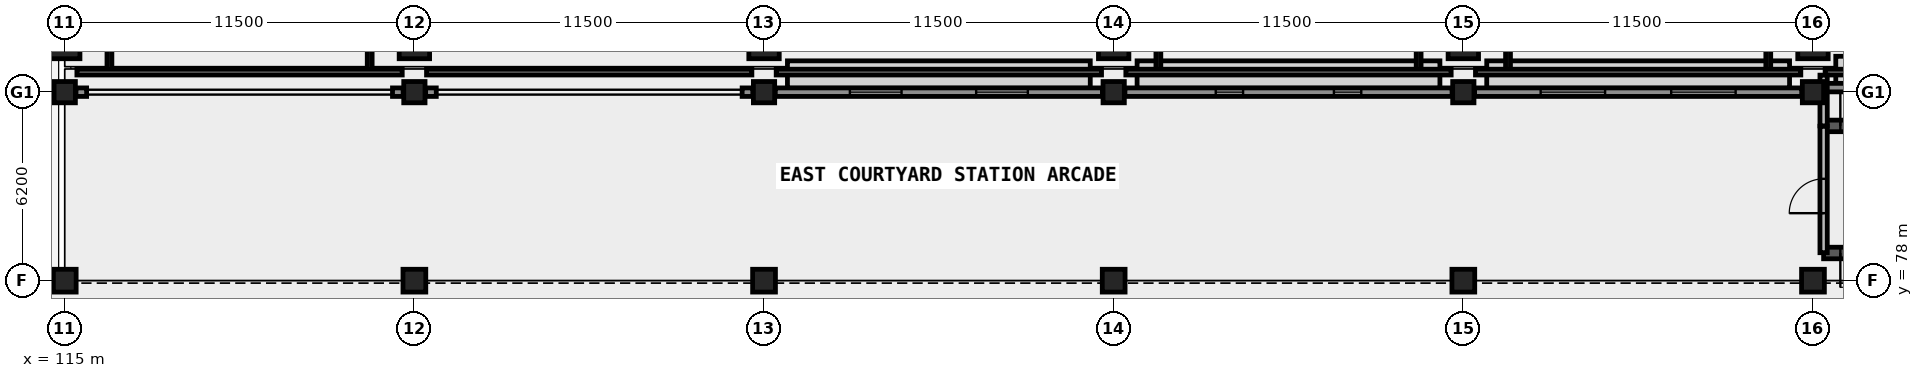
"""IFC4 building model, lengths in metres.
Left out: names, types, materials, properties, quantities, classifications, styles, units other than length and angle.
Written with IfcOpenShell. Run it as: python <this file> out.ifc"""

import sys

from ifc_helpers import new_model, si_unit, direction, frame, frame_2d, origin, origin_2d, place, context, subcontext, project, spatial, rectangle, extrude, element, fill, save


model = new_model("IFC4")
c1 = context("Model", 3, precision=1e-05, world=origin(), true_north=direction((0.0, 1.0)))
c2 = subcontext(c1, "Body", "Model", "MODEL_VIEW")
j1 = project(units=[si_unit("LENGTHUNIT", "METRE"), si_unit("PLANEANGLEUNIT", "RADIAN")], contexts=[c1])
p1 = place(None, origin())
s1 = spatial("IfcSite", under=j1, at=p1, CompositionType="ELEMENT")
p2 = place(p1, origin())
s2 = spatial("IfcBuilding", under=s1, at=p2, CompositionType="ELEMENT")
p3 = place(p2, origin())
s3 = spatial("IfcBuildingStorey", under=s2, at=p3, CompositionType="ELEMENT", Elevation=0.0)
p4 = place(p3, frame((115.0, 78.0, 0.0), z_axis=(0.0, 0.0, 1.0), x_axis=(1.0, 0.0, 0.0)))
e1 = element("IfcColumn", 1, at=p4, inside=s3, PredefinedType="COLUMN", context=c2, shape_type="SweptSolid", body=[
    extrude(rectangle(XDim=0.75, YDim=0.75, at=origin_2d()), origin(), (0.0, 0.0, 1.0), 4.2),
])
p5 = place(p3, frame((115.0, 84.2, 0.0), z_axis=(0.0, 0.0, 1.0), x_axis=(1.0, 0.0, 0.0)))
e2 = element("IfcColumn", 2, at=p5, inside=s3, PredefinedType="COLUMN", context=c2, shape_type="SweptSolid", body=[
    extrude(rectangle(XDim=0.7, YDim=0.7, at=origin_2d()), origin(), (0.0, 0.0, 1.0), 4.2),
])
p6 = place(p3, frame((115.0, 85.8, 0.0), z_axis=(0.0, 0.0, 1.0), x_axis=(1.0, 0.0, 0.0)))
e3 = element("IfcColumn", 3, at=p6, inside=s3, PredefinedType="COLUMN", context=c2, shape_type="SweptSolid", body=[
    extrude(rectangle(XDim=1.0, YDim=1.0, at=origin_2d()), origin(), (0.0, 0.0, 1.0), 4.2),
])
p7 = place(p3, frame((126.5, 78.0, 0.0), z_axis=(0.0, 0.0, 1.0), x_axis=(1.0, 0.0, 0.0)))
e4 = element("IfcColumn", 4, at=p7, inside=s3, PredefinedType="COLUMN", context=c2, shape_type="SweptSolid", body=[
    extrude(rectangle(XDim=0.75, YDim=0.75, at=origin_2d()), origin(), (0.0, 0.0, 1.0), 4.2),
])
p8 = place(p3, frame((126.5, 84.2, 0.0), z_axis=(0.0, 0.0, 1.0), x_axis=(1.0, 0.0, 0.0)))
e5 = element("IfcColumn", 5, at=p8, inside=s3, PredefinedType="COLUMN", context=c2, shape_type="SweptSolid", body=[
    extrude(rectangle(XDim=0.7, YDim=0.7, at=origin_2d()), origin(), (0.0, 0.0, 1.0), 4.2),
])
p9 = place(p3, frame((126.5, 85.8, 0.0), z_axis=(0.0, 0.0, 1.0), x_axis=(1.0, 0.0, 0.0)))
e6 = element("IfcColumn", 6, at=p9, inside=s3, PredefinedType="COLUMN", context=c2, shape_type="SweptSolid", body=[
    extrude(rectangle(XDim=1.0, YDim=1.0, at=origin_2d()), origin(), (0.0, 0.0, 1.0), 4.2),
])
p10 = place(p3, frame((138.0, 78.0, 0.0), z_axis=(0.0, 0.0, 1.0), x_axis=(1.0, 0.0, 0.0)))
e7 = element("IfcColumn", 7, at=p10, inside=s3, PredefinedType="COLUMN", context=c2, shape_type="SweptSolid", body=[
    extrude(rectangle(XDim=0.75, YDim=0.75, at=origin_2d()), origin(), (0.0, 0.0, 1.0), 4.2),
])
p11 = place(p3, frame((138.0, 84.2, 0.0), z_axis=(0.0, 0.0, 1.0), x_axis=(1.0, 0.0, 0.0)))
e8 = element("IfcColumn", 8, at=p11, inside=s3, PredefinedType="COLUMN", context=c2, shape_type="SweptSolid", body=[
    extrude(rectangle(XDim=0.7, YDim=0.7, at=origin_2d()), origin(), (0.0, 0.0, 1.0), 4.2),
])
p12 = place(p3, frame((138.0, 85.8, 0.0), z_axis=(0.0, 0.0, 1.0), x_axis=(1.0, 0.0, 0.0)))
e9 = element("IfcColumn", 9, at=p12, inside=s3, PredefinedType="COLUMN", context=c2, shape_type="SweptSolid", body=[
    extrude(rectangle(XDim=1.0, YDim=1.0, at=origin_2d()), origin(), (0.0, 0.0, 1.0), 4.2),
])
p13 = place(p3, frame((149.5, 78.0, 0.0), z_axis=(0.0, 0.0, 1.0), x_axis=(1.0, 0.0, 0.0)))
e10 = element("IfcColumn", 10, at=p13, inside=s3, PredefinedType="COLUMN", context=c2, shape_type="SweptSolid", body=[
    extrude(rectangle(XDim=0.75, YDim=0.75, at=origin_2d()), origin(), (0.0, 0.0, 1.0), 4.2),
])
p14 = place(p3, frame((149.5, 84.2, 0.0), z_axis=(0.0, 0.0, 1.0), x_axis=(1.0, 0.0, 0.0)))
e11 = element("IfcColumn", 11, at=p14, inside=s3, PredefinedType="COLUMN", context=c2, shape_type="SweptSolid", body=[
    extrude(rectangle(XDim=0.7, YDim=0.7, at=origin_2d()), origin(), (0.0, 0.0, 1.0), 4.2),
])
p15 = place(p3, frame((149.5, 85.8, 0.0), z_axis=(0.0, 0.0, 1.0), x_axis=(1.0, 0.0, 0.0)))
e12 = element("IfcColumn", 12, at=p15, inside=s3, PredefinedType="COLUMN", context=c2, shape_type="SweptSolid", body=[
    extrude(rectangle(XDim=1.0, YDim=1.0, at=origin_2d()), origin(), (0.0, 0.0, 1.0), 4.2),
])
p16 = place(p3, frame((161.0, 78.0, 0.0), z_axis=(0.0, 0.0, 1.0), x_axis=(1.0, 0.0, 0.0)))
e13 = element("IfcColumn", 13, at=p16, inside=s3, PredefinedType="COLUMN", context=c2, shape_type="SweptSolid", body=[
    extrude(rectangle(XDim=0.75, YDim=0.75, at=origin_2d()), origin(), (0.0, 0.0, 1.0), 4.2),
])
p17 = place(p3, frame((161.0, 84.2, 0.0), z_axis=(0.0, 0.0, 1.0), x_axis=(1.0, 0.0, 0.0)))
e14 = element("IfcColumn", 14, at=p17, inside=s3, PredefinedType="COLUMN", context=c2, shape_type="SweptSolid", body=[
    extrude(rectangle(XDim=0.7, YDim=0.7, at=origin_2d()), origin(), (0.0, 0.0, 1.0), 4.2),
])
p18 = place(p3, frame((161.0, 85.8, 0.0), z_axis=(0.0, 0.0, 1.0), x_axis=(1.0, 0.0, 0.0)))
e15 = element("IfcColumn", 15, at=p18, inside=s3, PredefinedType="COLUMN", context=c2, shape_type="SweptSolid", body=[
    extrude(rectangle(XDim=1.0, YDim=1.0, at=origin_2d()), origin(), (0.0, 0.0, 1.0), 4.2),
])
p19 = place(p3, frame((172.5, 78.0, 0.0), z_axis=(0.0, 0.0, 1.0), x_axis=(1.0, 0.0, 0.0)))
e16 = element("IfcColumn", 16, at=p19, inside=s3, PredefinedType="COLUMN", context=c2, shape_type="SweptSolid", body=[
    extrude(rectangle(XDim=0.75, YDim=0.75, at=origin_2d()), origin(), (0.0, 0.0, 1.0), 4.2),
])
p20 = place(p3, frame((172.5, 84.2, 0.0), z_axis=(0.0, 0.0, 1.0), x_axis=(1.0, 0.0, 0.0)))
e17 = element("IfcColumn", 17, at=p20, inside=s3, PredefinedType="COLUMN", context=c2, shape_type="SweptSolid", body=[
    extrude(rectangle(XDim=0.7, YDim=0.7, at=origin_2d()), origin(), (0.0, 0.0, 1.0), 4.2),
])
p21 = place(p3, frame((172.5, 85.8, 0.0), z_axis=(0.0, 0.0, 1.0), x_axis=(1.0, 0.0, 0.0)))
e18 = element("IfcColumn", 18, at=p21, inside=s3, PredefinedType="COLUMN", context=c2, shape_type="SweptSolid", body=[
    extrude(rectangle(XDim=1.0, YDim=1.0, at=origin_2d()), origin(), (0.0, 0.0, 1.0), 4.2),
])
p22 = place(p3, frame((172.85, 78.91, 0.0), z_axis=(0.0, 0.0, 1.0), x_axis=(1.0, 0.0, 0.0)))
e19 = element("IfcWall", 19, at=p22, inside=s3, PredefinedType="SHEAR", context=c2, shape_type="SweptSolid", body=[
    extrude(rectangle(XDim=8.8, YDim=0.38, at=frame_2d((4.4, 0.0))), origin(), (0.0, 0.0, 1.0), 4.2),
])
p23 = place(p22, frame((0.55, 0.0, 0.0)))
e20 = element("IfcOpeningElement", 20, at=p23, cuts=e19, PredefinedType="OPENING", context=c2, shape_type="SweptSolid", body=[
    extrude(rectangle(XDim=1.13, YDim=2.15, at=frame_2d((0.565, 1.075))), frame((0.0, 0.2, 0.0), z_axis=(0.0, -1.0, 0.0), x_axis=(1.0, 0.0, 0.0)), (0.0, 0.0, 1.0), 0.4),
])
p24 = place(p3, frame((172.85, 83.09, 0.0), z_axis=(0.0, 0.0, 1.0), x_axis=(1.0, 0.0, 0.0)))
e21 = element("IfcWall", 21, at=p24, inside=s3, PredefinedType="SHEAR", context=c2, shape_type="SweptSolid", body=[
    extrude(rectangle(XDim=8.8, YDim=0.38, at=frame_2d((4.4, 0.0))), origin(), (0.0, 0.0, 1.0), 4.2),
])
p25 = place(p24, frame((0.55, 0.0, 0.0)))
e22 = element("IfcOpeningElement", 22, at=p25, cuts=e21, PredefinedType="OPENING", context=c2, shape_type="SweptSolid", body=[
    extrude(rectangle(XDim=1.13, YDim=2.15, at=frame_2d((0.565, 1.075))), frame((0.0, 0.2, 0.0), z_axis=(0.0, -1.0, 0.0), x_axis=(1.0, 0.0, 0.0)), (0.0, 0.0, 1.0), 0.4),
])
for number, where, z_axis, x_axis in (
    (23, (115.37, 84.2, 0.0), (0.0, 0.0, 1.0), (1.0, 0.0, 0.0)),
    (24, (125.78, 84.2, 0.0), (0.0, 0.0, 1.0), (1.0, 0.0, 0.0)),
    (25, (126.87, 84.2, 0.0), (0.0, 0.0, 1.0), (1.0, 0.0, 0.0)),
    (26, (137.28, 84.2, 0.0), (0.0, 0.0, 1.0), (1.0, 0.0, 0.0)),
):
    element("IfcWall", number, at=place(p3, frame(where, z_axis=z_axis, x_axis=x_axis)), inside=s3, PredefinedType="SOLIDWALL", context=c2, shape_type="SweptSolid", body=[
        extrude(rectangle(XDim=0.35, YDim=0.28, at=frame_2d((0.175, 0.0))), origin(), (0.0, 0.0, 1.0), 3.85),
    ])
for number, where, z_axis, x_axis in (
    (27, (115.4, 84.86, 0.0), (0.0, 0.0, 1.0), (1.0, 0.0, 0.0)),
    (28, (126.9, 84.86, 0.0), (0.0, 0.0, 1.0), (1.0, 0.0, 0.0)),
    (29, (138.4, 84.86, 0.0), (0.0, 0.0, 1.0), (1.0, 0.0, 0.0)),
    (30, (149.9, 84.86, 0.0), (0.0, 0.0, 1.0), (1.0, 0.0, 0.0)),
    (31, (161.4, 84.86, 0.0), (0.0, 0.0, 1.0), (1.0, 0.0, 0.0)),
    (32, (172.9, 84.86, 0.0), (0.0, 0.0, 1.0), (1.0, 0.0, 0.0)),
):
    element("IfcWall", number, at=place(p3, frame(where, z_axis=z_axis, x_axis=x_axis)), inside=s3, PredefinedType="PARAPET", context=c2, shape_type="SweptSolid", body=[
        extrude(rectangle(XDim=10.7, YDim=0.19, at=frame_2d((5.35, 0.0))), origin(), (0.0, 0.0, 1.0), 1.15),
    ])
p26 = place(p3, frame((138.37, 84.2, 0.0), z_axis=(0.0, 0.0, 1.0), x_axis=(1.0, 0.0, 0.0)))
e33 = element("IfcWall", 33, at=p26, inside=s3, PredefinedType="SOLIDWALL", context=c2, shape_type="SweptSolid", body=[
    extrude(rectangle(XDim=10.76, YDim=0.28, at=frame_2d((5.38, 0.0))), origin(), (0.0, 0.0, 1.0), 3.0),
])
p27 = place(p26, frame((2.453, 0.0, 0.85)))
e34 = element("IfcOpeningElement", 34, at=p27, cuts=e33, PredefinedType="OPENING", context=c2, shape_type="SweptSolid", body=[
    extrude(rectangle(XDim=1.7, YDim=1.5, at=frame_2d((0.85, 0.75))), frame((0.0, 0.15, 0.0), z_axis=(0.0, -1.0, 0.0), x_axis=(1.0, 0.0, 0.0)), (0.0, 0.0, 1.0), 0.3),
])
p28 = place(p26, frame((6.607, 0.0, 0.85)))
e35 = element("IfcOpeningElement", 35, at=p28, cuts=e33, PredefinedType="OPENING", context=c2, shape_type="SweptSolid", body=[
    extrude(rectangle(XDim=1.7, YDim=1.5, at=frame_2d((0.85, 0.75))), frame((0.0, 0.15, 0.0), z_axis=(0.0, -1.0, 0.0), x_axis=(1.0, 0.0, 0.0)), (0.0, 0.0, 1.0), 0.3),
])
p29 = place(p3, frame((149.87, 84.2, 0.0), z_axis=(0.0, 0.0, 1.0), x_axis=(1.0, 0.0, 0.0)))
e36 = element("IfcWall", 36, at=p29, inside=s3, PredefinedType="SOLIDWALL", context=c2, shape_type="SweptSolid", body=[
    extrude(rectangle(XDim=10.76, YDim=0.28, at=frame_2d((5.38, 0.0))), origin(), (0.0, 0.0, 1.0), 3.0),
])
p30 = place(p29, frame((2.987, 0.0, 0.84)))
e37 = element("IfcOpeningElement", 37, at=p30, cuts=e36, PredefinedType="OPENING", context=c2, shape_type="SweptSolid", body=[
    extrude(rectangle(XDim=0.9, YDim=2.1, at=frame_2d((0.45, 1.05))), frame((0.0, 0.15, 0.0), z_axis=(0.0, -1.0, 0.0), x_axis=(1.0, 0.0, 0.0)), (0.0, 0.0, 1.0), 0.3),
])
p31 = place(p29, frame((6.873, 0.0, 0.84)))
e38 = element("IfcOpeningElement", 38, at=p31, cuts=e36, PredefinedType="OPENING", context=c2, shape_type="SweptSolid", body=[
    extrude(rectangle(XDim=0.9, YDim=2.1, at=frame_2d((0.45, 1.05))), frame((0.0, 0.15, 0.0), z_axis=(0.0, -1.0, 0.0), x_axis=(1.0, 0.0, 0.0)), (0.0, 0.0, 1.0), 0.3),
])
p32 = place(p3, frame((161.37, 84.2, 0.0), z_axis=(0.0, 0.0, 1.0), x_axis=(1.0, 0.0, 0.0)))
e39 = element("IfcWall", 39, at=p32, inside=s3, PredefinedType="SOLIDWALL", context=c2, shape_type="SweptSolid", body=[
    extrude(rectangle(XDim=10.76, YDim=0.28, at=frame_2d((5.38, 0.0))), origin(), (0.0, 0.0, 1.0), 3.0),
])
p33 = place(p32, frame((2.173, 0.0, 0.85)))
e40 = element("IfcOpeningElement", 40, at=p33, cuts=e39, PredefinedType="OPENING", context=c2, shape_type="SweptSolid", body=[
    extrude(rectangle(XDim=2.12, YDim=2.08, at=frame_2d((1.06, 1.04))), frame((0.0, 0.15, 0.0), z_axis=(0.0, -1.0, 0.0), x_axis=(1.0, 0.0, 0.0)), (0.0, 0.0, 1.0), 0.3),
])
p34 = place(p32, frame((6.467, 0.0, 0.85)))
e41 = element("IfcOpeningElement", 41, at=p34, cuts=e39, PredefinedType="OPENING", context=c2, shape_type="SweptSolid", body=[
    extrude(rectangle(XDim=2.12, YDim=2.08, at=frame_2d((1.06, 1.04))), frame((0.0, 0.15, 0.0), z_axis=(0.0, -1.0, 0.0), x_axis=(1.0, 0.0, 0.0)), (0.0, 0.0, 1.0), 0.3),
])
p35 = place(p3, frame((172.85, 84.35, 0.0), z_axis=(0.0, 0.0, 1.0), x_axis=(1.0, 0.0, 0.0)))
e42 = element("IfcWall", 42, at=p35, inside=s3, PredefinedType="SOLIDWALL", context=c2, shape_type="SweptSolid", body=[
    extrude(rectangle(XDim=10.8, YDim=0.28, at=frame_2d((5.4, 0.0))), origin(), (0.0, 0.0, 1.0), 3.0),
])
p36 = place(p35, frame((1.813, 0.0, 0.82)))
e43 = element("IfcOpeningElement", 43, at=p36, cuts=e42, PredefinedType="OPENING", context=c2, shape_type="SweptSolid", body=[
    extrude(rectangle(XDim=2.68, YDim=2.12, at=frame_2d((1.34, 1.06))), frame((0.0, 0.15, 0.0), z_axis=(0.0, -1.0, 0.0), x_axis=(1.0, 0.0, 0.0)), (0.0, 0.0, 1.0), 0.3),
])
p37 = place(p35, frame((6.307, 0.0, 0.82)))
e44 = element("IfcOpeningElement", 44, at=p37, cuts=e42, PredefinedType="OPENING", context=c2, shape_type="SweptSolid", body=[
    extrude(rectangle(XDim=2.68, YDim=2.12, at=frame_2d((1.34, 1.06))), frame((0.0, 0.15, 0.0), z_axis=(0.0, -1.0, 0.0), x_axis=(1.0, 0.0, 0.0)), (0.0, 0.0, 1.0), 0.3),
])
p38 = place(p3, frame((172.85, 78.92, 0.0), z_axis=(0.0, 0.0, 1.0), x_axis=(0.0, 1.0, 0.0)))
e45 = element("IfcWall", 45, at=p38, inside=s3, PredefinedType="SOLIDWALL", context=c2, shape_type="SweptSolid", body=[
    extrude(rectangle(XDim=4.16, YDim=0.24, at=frame_2d((2.08, 0.0))), origin(), (0.0, 0.0, 1.0), 3.88),
])
p39 = place(p38, frame((1.3, 0.0, 0.0)))
e46 = element("IfcOpeningElement", 46, at=p39, cuts=e45, PredefinedType="OPENING", context=c2, shape_type="SweptSolid", body=[
    extrude(rectangle(XDim=1.13, YDim=2.15, at=frame_2d((0.565, 1.075))), frame((0.0, 0.13, 0.0), z_axis=(0.0, -1.0, 0.0), x_axis=(1.0, 0.0, 0.0)), (0.0, 0.0, 1.0), 0.26),
])
p40 = place(p3, frame((172.85, 83.09, 0.0), z_axis=(0.0, 0.0, 1.0), x_axis=(0.0, 1.0, 0.0)))
e47 = element("IfcWall", 47, at=p40, inside=s3, PredefinedType="SOLIDWALL", context=c2, shape_type="SweptSolid", body=[
    extrude(rectangle(XDim=1.67, YDim=0.24, at=frame_2d((0.835, 0.0))), origin(), (0.0, 0.0, 1.0), 3.88),
])
p41 = place(p27, origin())
e48 = element("IfcWindow", 48, at=p41, inside=s3, PartitioningType="SINGLE_PANEL", PredefinedType="WINDOW", context=c2, shape_type="SweptSolid", body=[
    extrude(rectangle(XDim=1.7, YDim=1.5, at=frame_2d((0.85, 0.75))), frame((0.0, 0.03, 0.0), z_axis=(0.0, -1.0, 0.0), x_axis=(1.0, 0.0, 0.0)), (0.0, 0.0, 1.0), 0.06),
])
fill(e34, e48)
p42 = place(p28, origin())
e49 = element("IfcWindow", 49, at=p42, inside=s3, PartitioningType="SINGLE_PANEL", PredefinedType="WINDOW", context=c2, shape_type="SweptSolid", body=[
    extrude(rectangle(XDim=1.7, YDim=1.5, at=frame_2d((0.85, 0.75))), frame((0.0, 0.03, 0.0), z_axis=(0.0, -1.0, 0.0), x_axis=(1.0, 0.0, 0.0)), (0.0, 0.0, 1.0), 0.06),
])
fill(e35, e49)
p43 = place(p30, origin())
e50 = element("IfcWindow", 50, at=p43, inside=s3, PartitioningType="SINGLE_PANEL", PredefinedType="WINDOW", context=c2, shape_type="SweptSolid", body=[
    extrude(rectangle(XDim=0.9, YDim=2.1, at=frame_2d((0.45, 1.05))), frame((0.0, 0.03, 0.0), z_axis=(0.0, -1.0, 0.0), x_axis=(1.0, 0.0, 0.0)), (0.0, 0.0, 1.0), 0.06),
])
fill(e37, e50)
p44 = place(p31, origin())
e51 = element("IfcWindow", 51, at=p44, inside=s3, PartitioningType="SINGLE_PANEL", PredefinedType="WINDOW", context=c2, shape_type="SweptSolid", body=[
    extrude(rectangle(XDim=0.9, YDim=2.1, at=frame_2d((0.45, 1.05))), frame((0.0, 0.03, 0.0), z_axis=(0.0, -1.0, 0.0), x_axis=(1.0, 0.0, 0.0)), (0.0, 0.0, 1.0), 0.06),
])
fill(e38, e51)
p45 = place(p33, origin())
e52 = element("IfcWindow", 52, at=p45, inside=s3, PartitioningType="SINGLE_PANEL", PredefinedType="WINDOW", context=c2, shape_type="SweptSolid", body=[
    extrude(rectangle(XDim=2.12, YDim=2.08, at=frame_2d((1.06, 1.04))), frame((0.0, 0.03, 0.0), z_axis=(0.0, -1.0, 0.0), x_axis=(1.0, 0.0, 0.0)), (0.0, 0.0, 1.0), 0.06),
])
fill(e40, e52)
p46 = place(p34, origin())
e53 = element("IfcWindow", 53, at=p46, inside=s3, PartitioningType="SINGLE_PANEL", PredefinedType="WINDOW", context=c2, shape_type="SweptSolid", body=[
    extrude(rectangle(XDim=2.12, YDim=2.08, at=frame_2d((1.06, 1.04))), frame((0.0, 0.03, 0.0), z_axis=(0.0, -1.0, 0.0), x_axis=(1.0, 0.0, 0.0)), (0.0, 0.0, 1.0), 0.06),
])
fill(e41, e53)
p47 = place(p39, origin())
e54 = element("IfcDoor", 54, at=p47, inside=s3, OperationType="SINGLE_SWING_LEFT", PredefinedType="DOOR", context=c2, shape_type="SweptSolid", body=[
    extrude(rectangle(XDim=1.13, YDim=2.15, at=frame_2d((0.565, 1.075))), frame((0.0, 0.025, 0.0), z_axis=(0.0, -1.0, 0.0), x_axis=(1.0, 0.0, 0.0)), (0.0, 0.0, 1.0), 0.05),
])
fill(e46, e54)
p48 = place(p23, frame((0.565, 0.0, 0.0), z_axis=(0.0, 0.0, 1.0), x_axis=(-1.0, 0.0, 0.0)))
e55 = element("IfcDoor", 55, at=p48, inside=s3, OperationType="SINGLE_SWING_LEFT", PredefinedType="DOOR", context=c2, shape_type="SweptSolid", body=[
    extrude(rectangle(XDim=1.13, YDim=2.15, at=frame_2d((0.0, 1.075))), frame((0.0, 0.025, 0.0), z_axis=(0.0, -1.0, 0.0), x_axis=(1.0, 0.0, 0.0)), (0.0, 0.0, 1.0), 0.05),
])
fill(e20, e55)
p49 = place(p25, origin())
e56 = element("IfcDoor", 56, at=p49, inside=s3, OperationType="SINGLE_SWING_LEFT", PredefinedType="DOOR", context=c2, shape_type="SweptSolid", body=[
    extrude(rectangle(XDim=1.13, YDim=2.15, at=frame_2d((0.565, 1.075))), frame((0.0, 0.025, 0.0), z_axis=(0.0, -1.0, 0.0), x_axis=(1.0, 0.0, 0.0)), (0.0, 0.0, 1.0), 0.05),
])
fill(e22, e56)
save(model, sys.argv[1])
